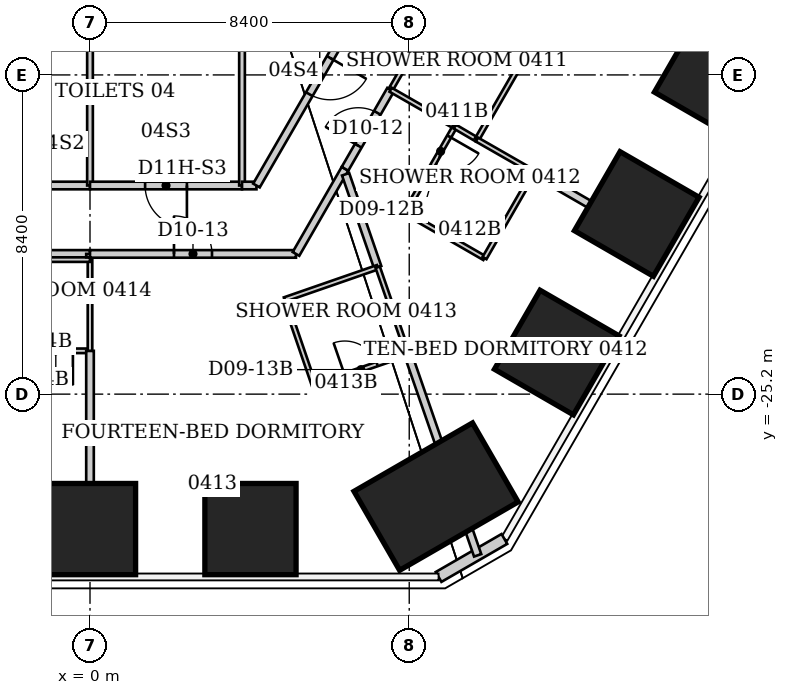
"""IFC4 building model, lengths in metres.
Left out: names, types, materials, properties, quantities, classifications, styles, units other than length and angle.
Written with IfcOpenShell. Run it as: python <this file> out.ifc"""

import sys

from ifc_helpers import new_model, si_unit, direction, frame, frame_2d, origin, origin_2d, place, context, subcontext, project, spatial, rectangle, extrude, element, fill, save


model = new_model("IFC4")
c1 = context("Model", 3, precision=1e-05, world=origin(), true_north=direction((0.0, 1.0)))
c2 = subcontext(c1, "Body", "Model", "MODEL_VIEW")
j1 = project(units=[si_unit("LENGTHUNIT", "METRE"), si_unit("PLANEANGLEUNIT", "RADIAN")], contexts=[c1])
p1 = place(None, origin())
s1 = spatial("IfcSite", under=j1, at=p1, CompositionType="ELEMENT")
p2 = place(p1, origin())
s2 = spatial("IfcBuilding", under=s1, at=p2, CompositionType="ELEMENT")
p3 = place(p2, frame((0.0, 0.0, 23.0)))
s3 = spatial("IfcBuildingStorey", under=s2, at=p3, CompositionType="ELEMENT", Elevation=23.0)
for number, where, z_axis, x_axis in (
    (1, (16.491, -16.813, 0.0), (0.0, 0.0, 1.0), (0.866, -0.5, 0.0)),
    (2, (14.387, -20.459, 0.0), (0.0, 0.0, 1.0), (0.866, -0.5, 0.0)),
    (3, (12.282, -24.105, 0.0), (0.0, 0.0, 1.0), (0.866, -0.5, 0.0)),
):
    element("IfcColumn", number, at=place(p3, frame(where, z_axis=z_axis, x_axis=x_axis)), inside=s3, PredefinedType="COLUMN", context=c2, shape_type="SweptSolid", body=[
        extrude(rectangle(XDim=2.4, YDim=2.4, at=origin_2d()), origin(), (0.0, 0.0, 1.0), 3.8),
    ])
p4 = place(p3, frame((9.106, -27.897, 0.0), z_axis=(0.0, 0.0, 1.0), x_axis=(0.5, -0.866025403784, 0.0)))
e4 = element("IfcColumn", 4, at=p4, inside=s3, PredefinedType="COLUMN", context=c2, shape_type="SweptSolid", body=[
    extrude(rectangle(XDim=2.4, YDim=3.6, at=origin_2d()), origin(), (0.0, 0.0, 1.0), 3.8),
])
for number, where, z_axis, x_axis in (
    (5, (4.222, -28.751, 0.0), (0.0, 0.0, 1.0), (0.0, -1.0, 0.0)),
    (6, (0.0, -28.751, 0.0), (0.0, 0.0, 1.0), (0.0, -1.0, 0.0)),
):
    element("IfcColumn", number, at=place(p3, frame(where, z_axis=z_axis, x_axis=x_axis)), inside=s3, PredefinedType="COLUMN", context=c2, shape_type="SweptSolid", body=[
        extrude(rectangle(XDim=2.4, YDim=2.4, at=origin_2d()), origin(), (0.0, 0.0, 1.0), 3.8),
    ])
p5 = place(p3, frame((10.904, -29.011, 0.0), z_axis=(0.0, 0.0, 1.0), x_axis=(-0.866010750942, -0.50002537861, 0.0)))
e7 = element("IfcWall", 7, at=p5, inside=s3, PredefinedType="SOLIDWALL", context=c2, shape_type="SweptSolid", body=[
    extrude(rectangle(XDim=2.0, YDim=0.3, at=frame_2d((1.0, 0.0))), origin(), (0.0, 0.0, 1.0), 3.64),
])
p6 = place(p3, frame((-5.42, -21.51, 0.0), z_axis=(0.0, 0.0, 1.0), x_axis=(1.0, 0.0, 0.0)))
e8 = element("IfcWall", 8, at=p6, inside=s3, PredefinedType="PARTITIONING", context=c2, shape_type="SweptSolid", body=[
    extrude(rectangle(XDim=5.42, YDim=0.2, at=frame_2d((2.71, 0.0))), origin(), (0.0, 0.0, 1.0), 3.64),
])
p7 = place(p6, frame((1.71, 0.0, 0.0)))
e9 = element("IfcOpeningElement", 9, at=p7, cuts=e8, PredefinedType="OPENING", context=c2, shape_type="SweptSolid", body=[
    extrude(rectangle(XDim=1.0, YDim=2.13, at=frame_2d((0.5, 1.065))), frame((0.0, 0.1, 0.0), z_axis=(0.0, -1.0, 0.0), x_axis=(1.0, 0.0, 0.0)), (0.0, 0.0, 1.0), 0.2),
])
p8 = place(p3, frame((-2.6, -24.06, 0.0), z_axis=(0.0, 0.0, 1.0), x_axis=(1.0, 0.0, 0.0)))
e10 = element("IfcWall", 10, at=p8, inside=s3, PredefinedType="PARTITIONING", context=c2, shape_type="SweptSolid", body=[
    extrude(rectangle(XDim=2.6, YDim=0.12, at=frame_2d((1.3, 0.0))), origin(), (0.0, 0.0, 1.0), 3.64),
])
p9 = place(p8, frame((1.25, 0.0, 0.0)))
e11 = element("IfcOpeningElement", 11, at=p9, cuts=e10, PredefinedType="OPENING", context=c2, shape_type="SweptSolid", body=[
    extrude(rectangle(XDim=0.9, YDim=2.03, at=frame_2d((0.45, 1.015))), frame((0.0, 0.06, 0.0), z_axis=(0.0, -1.0, 0.0), x_axis=(1.0, 0.0, 0.0)), (0.0, 0.0, 1.0), 0.12),
])
p10 = place(p3, frame((0.0, -29.89, 0.0), z_axis=(0.0, 0.0, 1.0), x_axis=(0.0, 1.0, 0.0)))
e12 = element("IfcWall", 12, at=p10, inside=s3, PredefinedType="PARTITIONING", context=c2, shape_type="SweptSolid", body=[
    extrude(rectangle(XDim=5.83, YDim=0.2, at=frame_2d((2.915, 0.0))), origin(), (0.0, 0.0, 1.0), 2.86),
])
p11 = place(p3, frame((0.0, -24.06, 0.0), z_axis=(0.0, 0.0, 1.0), x_axis=(0.0, 1.0, 0.0)))
e13 = element("IfcWall", 13, at=p11, inside=s3, PredefinedType="PARTITIONING", context=c2, shape_type="SweptSolid", body=[
    extrude(rectangle(XDim=2.4, YDim=0.12, at=frame_2d((1.2, 0.0))), origin(), (0.0, 0.0, 1.0), 2.86),
])
p12 = place(p3, frame((0.0, -21.66, 0.0), z_axis=(0.0, 0.0, 1.0), x_axis=(-1.0, 0.0, 0.0)))
e14 = element("IfcWall", 14, at=p12, inside=s3, PredefinedType="PARTITIONING", context=c2, shape_type="SweptSolid", body=[
    extrude(rectangle(XDim=2.6, YDim=0.12, at=frame_2d((1.3, 0.0))), origin(), (0.0, 0.0, 1.0), 3.64),
])
p13 = place(p3, frame((0.0, -21.6, 0.0), z_axis=(0.0, 0.0, 1.0), x_axis=(0.0, 1.0, 0.0)))
e15 = element("IfcWall", 15, at=p13, inside=s3, PredefinedType="PARTITIONING", context=c2, shape_type="SweptSolid", body=[
    extrude(rectangle(XDim=0.09, YDim=0.2, at=frame_2d((0.045, 0.0))), origin(), (0.0, 0.0, 1.0), 3.64),
])
p14 = place(p3, frame((0.0, -21.51, 0.0), z_axis=(0.0, 0.0, 1.0), x_axis=(1.0, 0.0, 0.0)))
e16 = element("IfcWall", 16, at=p14, inside=s3, PredefinedType="PARTITIONING", context=c2, shape_type="SweptSolid", body=[
    extrude(rectangle(XDim=5.42, YDim=0.2, at=frame_2d((2.71, 0.0))), origin(), (0.0, 0.0, 1.0), 3.64),
])
p15 = place(p14, frame((2.21, 0.0, 0.0)))
e17 = element("IfcOpeningElement", 17, at=p15, cuts=e16, PredefinedType="OPENING", context=c2, shape_type="SweptSolid", body=[
    extrude(rectangle(XDim=1.0, YDim=2.13, at=frame_2d((0.5, 1.065))), frame((0.0, 0.1, 0.0), z_axis=(0.0, -1.0, 0.0), x_axis=(1.0, 0.0, 0.0)), (0.0, 0.0, 1.0), 0.2),
])
p16 = place(p3, frame((0.0, -19.71, 0.0), z_axis=(0.0, 0.0, 1.0), x_axis=(-1.0, 0.0, 0.0)))
e18 = element("IfcWall", 18, at=p16, inside=s3, PredefinedType="PARTITIONING", context=c2, shape_type="SweptSolid", body=[
    extrude(rectangle(XDim=4.0, YDim=0.2, at=frame_2d((2.0, 0.0))), origin(), (0.0, 0.0, 1.0), 3.64),
])
p17 = place(p3, frame((0.0, -13.95, 0.0), z_axis=(0.0, 0.0, 1.0), x_axis=(0.0, -1.0, 0.0)))
e19 = element("IfcWall", 19, at=p17, inside=s3, PredefinedType="PARTITIONING", context=c2, shape_type="SweptSolid", body=[
    extrude(rectangle(XDim=5.76, YDim=0.15, at=frame_2d((2.88, 0.0))), origin(), (0.0, 0.0, 1.0), 2.86),
])
p18 = place(p3, frame((4.0, -19.71, 0.0), z_axis=(0.0, 0.0, 1.0), x_axis=(-1.0, 0.0, 0.0)))
e20 = element("IfcWall", 20, at=p18, inside=s3, PredefinedType="PARTITIONING", context=c2, shape_type="SweptSolid", body=[
    extrude(rectangle(XDim=4.0, YDim=0.2, at=frame_2d((2.0, 0.0))), origin(), (0.0, 0.0, 1.0), 3.64),
])
p19 = place(p18, frame((1.45, 0.0, 0.0)))
e21 = element("IfcOpeningElement", 21, at=p19, cuts=e20, PredefinedType="OPENING", context=c2, shape_type="SweptSolid", body=[
    extrude(rectangle(XDim=1.1, YDim=2.2, at=frame_2d((0.55, 1.1))), frame((0.0, 0.1, 0.0), z_axis=(0.0, -1.0, 0.0), x_axis=(1.0, 0.0, 0.0)), (0.0, 0.0, 1.0), 0.2),
])
p20 = place(p3, frame((4.0, -13.95, 0.0), z_axis=(0.0, 0.0, 1.0), x_axis=(0.0, -1.0, 0.0)))
e22 = element("IfcWall", 22, at=p20, inside=s3, PredefinedType="PARTITIONING", context=c2, shape_type="SweptSolid", body=[
    extrude(rectangle(XDim=5.76, YDim=0.15, at=frame_2d((2.88, 0.0))), origin(), (0.0, 0.0, 1.0), 3.64),
])
p21 = place(p3, frame((4.38, -19.71, 0.0), z_axis=(0.0, 0.0, 1.0), x_axis=(-1.0, 0.0, 0.0)))
e23 = element("IfcWall", 23, at=p21, inside=s3, PredefinedType="PARTITIONING", context=c2, shape_type="SweptSolid", body=[
    extrude(rectangle(XDim=0.38, YDim=0.2, at=frame_2d((0.19, 0.0))), origin(), (0.0, 0.0, 1.0), 3.64),
])
p22 = place(p3, frame((5.12, -22.71, 0.0), z_axis=(0.0, 0.0, 1.0), x_axis=(0.324880771143, -0.945754981241, 0.0)))
e24 = element("IfcWall", 24, at=p22, inside=s3, PredefinedType="PARTITIONING", context=c2, shape_type="SweptSolid", body=[
    extrude(rectangle(XDim=2.4, YDim=0.12, at=frame_2d((1.2, 0.0))), origin(), (0.0, 0.0, 1.0), 3.64),
])
p23 = place(p3, frame((5.9, -24.98, 0.0), z_axis=(0.0, 0.0, 1.0), x_axis=(0.945165466094, 0.326591857987, 0.0)))
e25 = element("IfcWall", 25, at=p23, inside=s3, PredefinedType="PARTITIONING", context=c2, shape_type="SweptSolid", body=[
    extrude(rectangle(XDim=2.603, YDim=0.12, at=frame_2d((1.302, 0.0))), origin(), (0.0, 0.0, 1.0), 3.64),
])
p24 = place(p23, frame((0.85, 0.0, 0.0)))
e26 = element("IfcOpeningElement", 26, at=p24, cuts=e25, PredefinedType="OPENING", context=c2, shape_type="SweptSolid", body=[
    extrude(rectangle(XDim=0.9, YDim=2.03, at=frame_2d((0.45, 1.015))), frame((0.0, 0.06, 0.0), z_axis=(0.0, -1.0, 0.0), x_axis=(1.0, 0.0, 0.0)), (0.0, 0.0, 1.0), 0.12),
])
p25 = place(p3, frame((6.71, -19.27, 0.0), z_axis=(0.0, 0.0, 1.0), x_axis=(-0.499065468721, -0.866564283784, 0.0)))
e27 = element("IfcWall", 27, at=p25, inside=s3, PredefinedType="PARTITIONING", context=c2, shape_type="SweptSolid", body=[
    extrude(rectangle(XDim=2.585, YDim=0.2, at=frame_2d((1.292, 0.0))), origin(), (0.0, 0.0, 1.0), 3.64),
])
p26 = place(p3, frame((6.71, -19.27, 0.0), z_axis=(0.0, 0.0, 1.0), x_axis=(0.499693115345, 0.866202511239, 0.0)))
e28 = element("IfcWall", 28, at=p26, inside=s3, PredefinedType="PARTITIONING", context=c2, shape_type="SweptSolid", body=[
    extrude(rectangle(XDim=2.401, YDim=0.2, at=frame_2d((1.201, 0.0))), origin(), (0.0, 0.0, 1.0), 3.64),
])
p27 = place(p26, frame((0.701, 0.0, 0.0)))
e29 = element("IfcOpeningElement", 29, at=p27, cuts=e28, PredefinedType="OPENING", context=c2, shape_type="SweptSolid", body=[
    extrude(rectangle(XDim=1.0, YDim=2.13, at=frame_2d((0.5, 1.065))), frame((0.0, 0.1, 0.0), z_axis=(0.0, -1.0, 0.0), x_axis=(1.0, 0.0, 0.0)), (0.0, 0.0, 1.0), 0.2),
])
p28 = place(p3, frame((6.726, -19.414, 0.0), z_axis=(0.0, 0.0, 1.0), x_axis=(0.326258175708, -0.945280700524, 0.0)))
e30 = element("IfcWall", 30, at=p28, inside=s3, PredefinedType="PARTITIONING", context=c2, shape_type="SweptSolid", body=[
    extrude(rectangle(XDim=2.588, YDim=0.2, at=frame_2d((1.294, 0.0))), origin(), (0.0, 0.0, 1.0), 3.64),
])
p29 = place(p3, frame((7.57, -21.86, 0.0), z_axis=(0.0, 0.0, 1.0), x_axis=(-0.944782191137, -0.327698964463, 0.0)))
e31 = element("IfcWall", 31, at=p29, inside=s3, PredefinedType="PARTITIONING", context=c2, shape_type="SweptSolid", body=[
    extrude(rectangle(XDim=2.594, YDim=0.12, at=frame_2d((1.297, 0.0))), origin(), (0.0, 0.0, 1.0), 3.64),
])
p30 = place(p3, frame((7.57, -21.86, 0.0), z_axis=(0.0, 0.0, 1.0), x_axis=(0.327706459026, -0.944779591605, 0.0)))
e32 = element("IfcWall", 32, at=p30, inside=s3, PredefinedType="PARTITIONING", context=c2, shape_type="SweptSolid", body=[
    extrude(rectangle(XDim=2.35, YDim=0.12, at=frame_2d((1.175, 0.0))), origin(), (0.0, 0.0, 1.0), 3.64),
])
p31 = place(p3, frame((7.71, -13.95, 0.0), z_axis=(0.0, 0.0, 1.0), x_axis=(-0.500511113963, -0.865730110831, 0.0)))
e33 = element("IfcWall", 33, at=p31, inside=s3, PredefinedType="PARTITIONING", context=c2, shape_type="SweptSolid", body=[
    extrude(rectangle(XDim=6.653, YDim=0.2, at=frame_2d((3.327, 0.0))), origin(), (0.0, 0.0, 1.0), 3.64),
])
p32 = place(p31, frame((2.777, 0.0, 0.0)))
e34 = element("IfcOpeningElement", 34, at=p32, cuts=e33, PredefinedType="OPENING", context=c2, shape_type="SweptSolid", body=[
    extrude(rectangle(XDim=1.1, YDim=2.2, at=frame_2d((0.55, 1.1))), frame((0.0, 0.1, 0.0), z_axis=(0.0, -1.0, 0.0), x_axis=(1.0, 0.0, 0.0)), (0.0, 0.0, 1.0), 0.2),
])
p33 = place(p3, frame((7.91, -17.19, 0.0), z_axis=(0.0, 0.0, 1.0), x_axis=(0.499737123639, 0.866177122335, 0.0)))
e35 = element("IfcWall", 35, at=p33, inside=s3, PredefinedType="PARTITIONING", context=c2, shape_type="SweptSolid", body=[
    extrude(rectangle(XDim=2.401, YDim=0.12, at=frame_2d((1.201, 0.0))), origin(), (0.0, 0.0, 1.0), 3.64),
])
p34 = place(p3, frame((7.91, -17.19, 0.0), z_axis=(0.0, 0.0, 1.0), x_axis=(0.8673242112, -0.497743621421, 0.0)))
e36 = element("IfcWall", 36, at=p34, inside=s3, PredefinedType="PARTITIONING", context=c2, shape_type="SweptSolid", body=[
    extrude(rectangle(XDim=1.949, YDim=0.12, at=frame_2d((0.974, 0.0))), origin(), (0.0, 0.0, 1.0), 3.64),
])
p35 = place(p3, frame((8.3, -20.42, 0.0), z_axis=(0.0, 0.0, 1.0), x_axis=(0.866177122335, -0.499737123639, 0.0)))
e37 = element("IfcWall", 37, at=p35, inside=s3, PredefinedType="PARTITIONING", context=c2, shape_type="SweptSolid", body=[
    extrude(rectangle(XDim=2.401, YDim=0.12, at=frame_2d((1.201, 0.0))), origin(), (0.0, 0.0, 1.0), 3.64),
])
p36 = place(p3, frame((8.36, -24.13, 0.0), z_axis=(0.0, 0.0, 1.0), x_axis=(0.327332811485, -0.944909112309, 0.0)))
e38 = element("IfcWall", 38, at=p36, inside=s3, PredefinedType="PARTITIONING", context=c2, shape_type="SweptSolid", body=[
    extrude(rectangle(XDim=5.621, YDim=0.2, at=frame_2d((2.811, 0.0))), origin(), (0.0, 0.0, 1.0), 3.64),
])
p37 = place(p3, frame((9.6, -18.16, 0.0), z_axis=(0.0, 0.0, 1.0), x_axis=(-0.498627694264, -0.866816256489, 0.0)))
e39 = element("IfcWall", 39, at=p37, inside=s3, PredefinedType="PARTITIONING", context=c2, shape_type="SweptSolid", body=[
    extrude(rectangle(XDim=2.607, YDim=0.12, at=frame_2d((1.304, 0.0))), origin(), (0.0, 0.0, 1.0), 3.64),
])
p38 = place(p37, frame((0.3, 0.0, 0.0)))
e40 = element("IfcOpeningElement", 40, at=p38, cuts=e39, PredefinedType="OPENING", context=c2, shape_type="SweptSolid", body=[
    extrude(rectangle(XDim=0.9, YDim=2.03, at=frame_2d((0.45, 1.015))), frame((0.0, 0.06, 0.0), z_axis=(0.0, -1.0, 0.0), x_axis=(1.0, 0.0, 0.0)), (0.0, 0.0, 1.0), 0.12),
])
p39 = place(p3, frame((9.6, -18.16, 0.0), z_axis=(0.0, 0.0, 1.0), x_axis=(0.862577739272, -0.505924543497, 0.0)))
e41 = element("IfcWall", 41, at=p39, inside=s3, PredefinedType="PARTITIONING", context=c2, shape_type="SweptSolid", body=[
    extrude(rectangle(XDim=0.672, YDim=0.12, at=frame_2d((0.336, 0.0))), origin(), (0.0, 0.0, 1.0), 3.64),
])
p40 = place(p3, frame((10.18, -18.5, 0.0), z_axis=(0.0, 0.0, 1.0), x_axis=(0.499693115345, 0.866202511239, 0.0)))
e42 = element("IfcWall", 42, at=p40, inside=s3, PredefinedType="PARTITIONING", context=c2, shape_type="SweptSolid", body=[
    extrude(rectangle(XDim=2.401, YDim=0.12, at=frame_2d((1.201, 0.0))), origin(), (0.0, 0.0, 1.0), 3.64),
])
p41 = place(p3, frame((10.18, -18.5, 0.0), z_axis=(0.0, 0.0, 1.0), x_axis=(0.867564547129, -0.497324598794, 0.0)))
e43 = element("IfcWall", 43, at=p41, inside=s3, PredefinedType="PARTITIONING", context=c2, shape_type="SweptSolid", body=[
    extrude(rectangle(XDim=1.729, YDim=0.12, at=frame_2d((0.865, 0.0))), origin(), (0.0, 0.0, 1.0), 3.64),
])
p42 = place(p3, frame((10.38, -21.62, 0.0), z_axis=(0.0, 0.0, 1.0), x_axis=(0.498627694264, 0.866816256489, 0.0)))
e44 = element("IfcWall", 44, at=p42, inside=s3, PredefinedType="PARTITIONING", context=c2, shape_type="SweptSolid", body=[
    extrude(rectangle(XDim=2.607, YDim=0.12, at=frame_2d((1.304, 0.0))), origin(), (0.0, 0.0, 1.0), 3.64),
])
p43 = place(p3, frame((11.38, -16.42, 0.0), z_axis=(0.0, 0.0, 1.0), x_axis=(-0.866154567199, 0.49977621564, 0.0)))
e45 = element("IfcWall", 45, at=p43, inside=s3, PredefinedType="PARTITIONING", context=c2, shape_type="SweptSolid", body=[
    extrude(rectangle(XDim=2.621, YDim=0.12, at=frame_2d((1.311, 0.0))), origin(), (0.0, 0.0, 1.0), 2.878),
])
p44 = place(p43, frame((1.421, 0.0, 0.0)))
e46 = element("IfcOpeningElement", 46, at=p44, cuts=e45, PredefinedType="OPENING", context=c2, shape_type="SweptSolid", body=[
    extrude(rectangle(XDim=0.9, YDim=2.03, at=frame_2d((0.45, 1.015))), frame((0.0, 0.06, 0.0), z_axis=(0.0, -1.0, 0.0), x_axis=(1.0, 0.0, 0.0)), (0.0, 0.0, 1.0), 0.12),
])
p45 = place(p3, frame((11.68, -19.36, 0.0), z_axis=(0.0, 0.0, 1.0), x_axis=(0.865885444553, -0.500242338183, 0.0)))
e47 = element("IfcWall", 47, at=p45, inside=s3, PredefinedType="PARTITIONING", context=c2, shape_type="SweptSolid", body=[
    extrude(rectangle(XDim=4.038, YDim=0.2, at=frame_2d((2.019, 0.0))), origin(), (0.0, 0.0, 1.0), 3.64),
])
p46 = place(p27, origin())
e48 = element("IfcDoor", 48, at=p46, inside=s3, OperationType="SINGLE_SWING_LEFT", PredefinedType="DOOR", context=c2, shape_type="SweptSolid", body=[
    extrude(rectangle(XDim=1.0, YDim=2.13, at=frame_2d((0.5, 1.065))), frame((0.0, 0.025, 0.0), z_axis=(0.0, -1.0, 0.0), x_axis=(1.0, 0.0, 0.0)), (0.0, 0.0, 1.0), 0.05),
])
fill(e29, e48)
p47 = place(p38, origin())
e49 = element("IfcDoor", 49, at=p47, inside=s3, OperationType="SINGLE_SWING_LEFT", PredefinedType="DOOR", context=c2, shape_type="SweptSolid", body=[
    extrude(rectangle(XDim=0.9, YDim=2.03, at=frame_2d((0.45, 1.015))), frame((0.0, 0.025, 0.0), z_axis=(0.0, -1.0, 0.0), x_axis=(1.0, 0.0, 0.0)), (0.0, 0.0, 1.0), 0.05),
])
fill(e40, e49)
p48 = place(p15, origin())
e50 = element("IfcDoor", 50, at=p48, inside=s3, OperationType="SINGLE_SWING_LEFT", PredefinedType="DOOR", context=c2, shape_type="SweptSolid", body=[
    extrude(rectangle(XDim=1.0, YDim=2.13, at=frame_2d((0.5, 1.065))), frame((0.0, 0.025, 0.0), z_axis=(0.0, -1.0, 0.0), x_axis=(1.0, 0.0, 0.0)), (0.0, 0.0, 1.0), 0.05),
])
fill(e17, e50)
p49 = place(p24, origin())
e51 = element("IfcDoor", 51, at=p49, inside=s3, OperationType="SINGLE_SWING_LEFT", PredefinedType="DOOR", context=c2, shape_type="SweptSolid", body=[
    extrude(rectangle(XDim=0.9, YDim=2.03, at=frame_2d((0.45, 1.015))), frame((0.0, 0.025, 0.0), z_axis=(0.0, -1.0, 0.0), x_axis=(1.0, 0.0, 0.0)), (0.0, 0.0, 1.0), 0.05),
])
fill(e26, e51)
p50 = place(p9, origin())
e52 = element("IfcDoor", 52, at=p50, inside=s3, OperationType="SINGLE_SWING_RIGHT", PredefinedType="DOOR", context=c2, shape_type="SweptSolid", body=[
    extrude(rectangle(XDim=0.9, YDim=2.03, at=frame_2d((0.45, 1.015))), frame((0.0, 0.025, 0.0), z_axis=(0.0, -1.0, 0.0), x_axis=(1.0, 0.0, 0.0)), (0.0, 0.0, 1.0), 0.05),
])
fill(e11, e52)
p51 = place(p19, origin())
e53 = element("IfcDoor", 53, at=p51, inside=s3, OperationType="SINGLE_SWING_LEFT", PredefinedType="DOOR", context=c2, shape_type="SweptSolid", body=[
    extrude(rectangle(XDim=1.1, YDim=2.2, at=frame_2d((0.55, 1.1))), frame((0.0, 0.025, 0.0), z_axis=(0.0, -1.0, 0.0), x_axis=(1.0, 0.0, 0.0)), (0.0, 0.0, 1.0), 0.05),
])
fill(e21, e53)
p52 = place(p32, origin())
e54 = element("IfcDoor", 54, at=p52, inside=s3, OperationType="SINGLE_SWING_LEFT", PredefinedType="DOOR", context=c2, shape_type="SweptSolid", body=[
    extrude(rectangle(XDim=1.1, YDim=2.2, at=frame_2d((0.55, 1.1))), frame((0.0, 0.025, 0.0), z_axis=(0.0, -1.0, 0.0), x_axis=(1.0, 0.0, 0.0)), (0.0, 0.0, 1.0), 0.05),
])
fill(e34, e54)
save(model, sys.argv[1])
